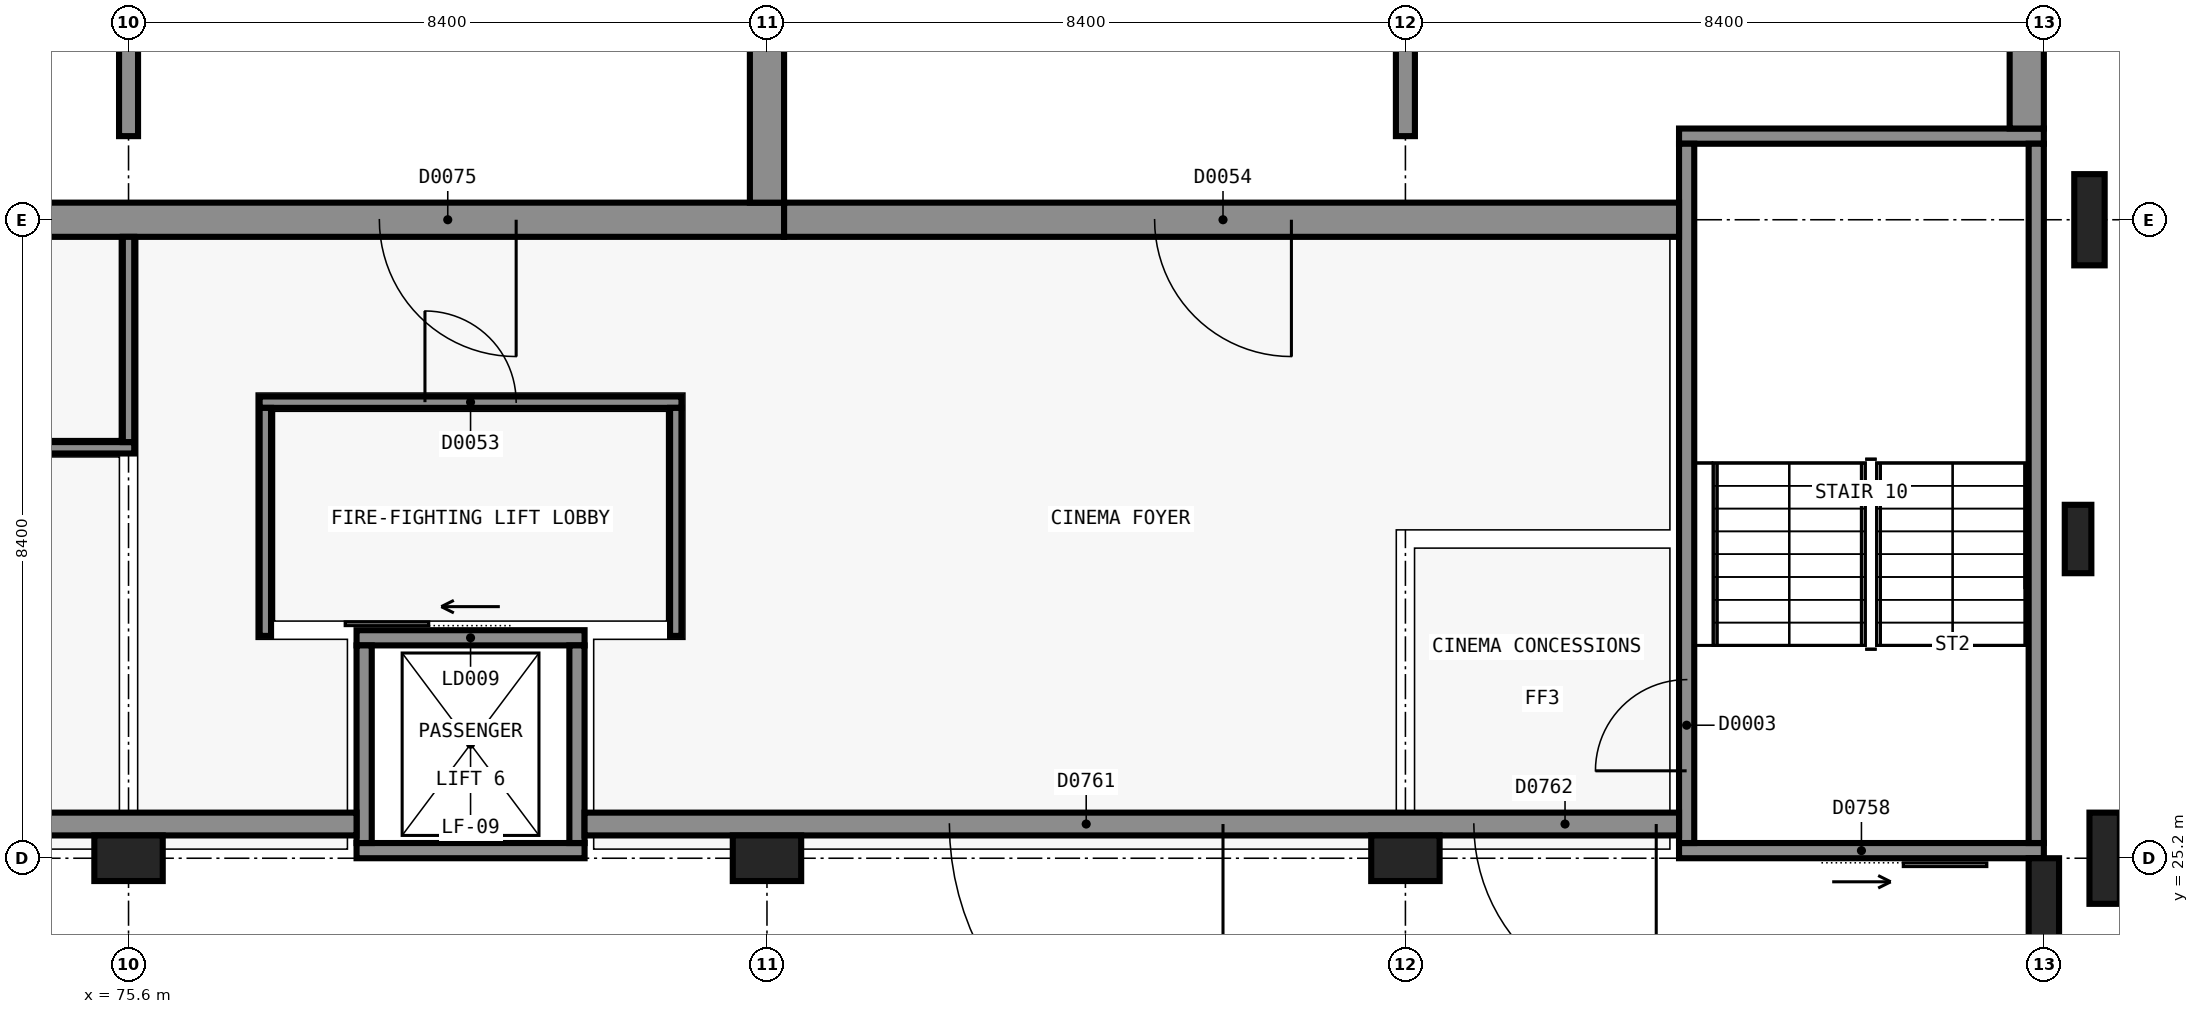
"""IFC4 building model, lengths in metres.
Left out: names, types, materials, properties, quantities, classifications, styles, units other than length and angle.
Written with IfcOpenShell. Run it as: python <this file> out.ifc"""

import sys

from ifc_helpers import new_model, si_unit, direction, frame, frame_2d, origin, origin_2d, place, context, subcontext, project, spatial, polyline, rectangle, outline, extrude, element, fill, save


model = new_model("IFC4")
c1 = context("Model", 3, precision=1e-05, world=origin(), true_north=direction((0.0, 1.0)))
c2 = subcontext(c1, "Body", "Model", "MODEL_VIEW")
j1 = project(units=[si_unit("LENGTHUNIT", "METRE"), si_unit("PLANEANGLEUNIT", "RADIAN")], contexts=[c1])
p1 = place(None, origin())
s1 = spatial("IfcSite", under=j1, at=p1, CompositionType="ELEMENT")
p2 = place(p1, origin())
s2 = spatial("IfcBuilding", under=s1, at=p2, CompositionType="ELEMENT")
p3 = place(p2, origin())
s3 = spatial("IfcBuildingStorey", under=s2, at=p3, CompositionType="ELEMENT", Elevation=0.0)
p4 = place(p3, frame((100.8, 25.3, -0.3), z_axis=(0.0, 0.0, 1.0), x_axis=(-1.0, 0.0, 0.0)))
e1 = element("IfcWall", 1, at=p4, inside=s3, PredefinedType="SHEAR", context=c2, shape_type="SweptSolid", body=[
    extrude(rectangle(XDim=4.8, YDim=0.2, at=frame_2d((2.4, 0.0))), origin(), (0.0, 0.0, 1.0), 5.7),
])
p5 = place(p4, frame((1.85, 0.0, 0.0)))
e2 = element("IfcOpeningElement", 2, at=p5, cuts=e1, PredefinedType="OPENING", context=c2, shape_type="SweptSolid", body=[
    extrude(rectangle(XDim=1.1, YDim=2.2, at=frame_2d((0.55, 1.1))), frame((0.0, 0.11, 0.0), z_axis=(0.0, -1.0, 0.0), x_axis=(1.0, 0.0, 0.0)), (0.0, 0.0, 1.0), 0.22),
])
p6 = place(p3, frame((96.0, 34.7, -0.3), z_axis=(0.0, 0.0, 1.0), x_axis=(1.0, 0.0, 0.0)))
e3 = element("IfcWall", 3, at=p6, inside=s3, PredefinedType="SHEAR", context=c2, shape_type="SweptSolid", body=[
    extrude(rectangle(XDim=4.8, YDim=0.2, at=frame_2d((2.4, 0.0))), origin(), (0.0, 0.0, 1.0), 5.7),
])
p7 = place(p3, frame((96.1, 25.4, -0.3), z_axis=(0.0, 0.0, 1.0), x_axis=(0.0, 1.0, 0.0)))
e4 = element("IfcWall", 4, at=p7, inside=s3, PredefinedType="SHEAR", context=c2, shape_type="SweptSolid", body=[
    extrude(rectangle(XDim=9.2, YDim=0.2, at=frame_2d((4.6, 0.0))), origin(), (0.0, 0.0, 1.0), 5.7),
])
p8 = place(p7, frame((0.95, 0.0, 0.3)))
e5 = element("IfcOpeningElement", 5, at=p8, cuts=e4, PredefinedType="OPENING", context=c2, shape_type="SweptSolid", body=[
    extrude(rectangle(XDim=1.2, YDim=2.1, at=frame_2d((0.6, 1.05))), frame((0.0, 0.11, 0.0), z_axis=(0.0, -1.0, 0.0), x_axis=(1.0, 0.0, 0.0)), (0.0, 0.0, 1.0), 0.22),
])
p9 = place(p3, frame((100.7, 34.6, -0.3), z_axis=(0.0, 0.0, 1.0), x_axis=(0.0, -1.0, 0.0)))
e6 = element("IfcWall", 6, at=p9, inside=s3, PredefinedType="SHEAR", context=c2, shape_type="SweptSolid", body=[
    extrude(rectangle(XDim=9.2, YDim=0.2, at=frame_2d((4.6, 0.0))), origin(), (0.0, 0.0, 1.0), 5.7),
])
p10 = place(p3, frame((81.6, 25.3, -1.6), z_axis=(0.0, 0.0, 1.0), x_axis=(-1.0, 0.0, 0.0)))
e7 = element("IfcWall", 7, at=p10, inside=s3, PredefinedType="SHEAR", context=c2, shape_type="SweptSolid", body=[
    extrude(rectangle(XDim=3.0, YDim=0.2, at=frame_2d((1.5, 0.0))), origin(), (0.0, 0.0, 1.0), 7.0),
])
p11 = place(p3, frame((78.6, 28.1, -1.6), z_axis=(0.0, 0.0, 1.0), x_axis=(1.0, 0.0, 0.0)))
e8 = element("IfcWall", 8, at=p11, inside=s3, PredefinedType="SHEAR", context=c2, shape_type="SweptSolid", body=[
    extrude(rectangle(XDim=3.0, YDim=0.2, at=frame_2d((1.5, 0.0))), origin(), (0.0, 0.0, 1.0), 7.0),
])
p12 = place(p11, frame((0.95, 0.0, 1.6)))
e9 = element("IfcOpeningElement", 9, at=p12, cuts=e8, PredefinedType="OPENING", context=c2, shape_type="SweptSolid", body=[
    extrude(rectangle(XDim=1.1, YDim=2.1, at=frame_2d((0.55, 1.05))), frame((0.0, 0.11, 0.0), z_axis=(0.0, -1.0, 0.0), x_axis=(1.0, 0.0, 0.0)), (0.0, 0.0, 1.0), 0.22),
])
for number, where, z_axis, x_axis in (
    (10, (78.7, 25.4, -1.6), (0.0, 0.0, 1.0), (0.0, 1.0, 0.0)),
    (11, (81.5, 28.0, -1.6), (0.0, 0.0, 1.0), (0.0, -1.0, 0.0)),
):
    element("IfcWall", number, at=place(p3, frame(where, z_axis=z_axis, x_axis=x_axis)), inside=s3, PredefinedType="SHEAR", context=c2, shape_type="SweptSolid", body=[
        extrude(rectangle(XDim=2.6, YDim=0.2, at=frame_2d((1.3, 0.0))), origin(), (0.0, 0.0, 1.0), 7.0),
    ])
p13 = place(p3, frame((84.225, 33.6, -0.3), z_axis=(0.0, 0.0, 1.0), x_axis=(-1.0, 0.0, 0.0)))
e12 = element("IfcWall", 12, at=p13, inside=s3, PredefinedType="SHEAR", context=c2, shape_type="SweptSolid", body=[
    extrude(rectangle(XDim=17.025, YDim=0.45, at=frame_2d((8.513, 0.0))), origin(), (0.0, 0.0, 1.0), 5.7),
])
p14 = place(p13, frame((3.525, 0.0, 0.3)))
e13 = element("IfcOpeningElement", 13, at=p14, cuts=e12, PredefinedType="OPENING", context=c2, shape_type="SweptSolid", body=[
    extrude(rectangle(XDim=1.8, YDim=2.1, at=frame_2d((0.9, 1.05))), frame((0.0, 0.235, 0.0), z_axis=(0.0, -1.0, 0.0), x_axis=(1.0, 0.0, 0.0)), (0.0, 0.0, 1.0), 0.47),
])
p15 = place(p3, frame((84.0, 58.575, -0.3), z_axis=(0.0, 0.0, 1.0), x_axis=(0.0, -1.0, 0.0)))
e14 = element("IfcWall", 14, at=p15, inside=s3, PredefinedType="SHEAR", context=c2, shape_type="SweptSolid", body=[
    extrude(rectangle(XDim=24.75, YDim=0.45, at=frame_2d((12.375, 0.0))), origin(), (0.0, 0.0, 1.0), 5.7),
])
p16 = place(p3, frame((96.0, 33.6, -0.3), z_axis=(0.0, 0.0, 1.0), x_axis=(-1.0, 0.0, 0.0)))
e15 = element("IfcWall", 15, at=p16, inside=s3, PredefinedType="SHEAR", context=c2, shape_type="SweptSolid", body=[
    extrude(rectangle(XDim=11.775, YDim=0.45, at=frame_2d((5.887, 0.0))), origin(), (0.0, 0.0, 1.0), 5.7),
])
p17 = place(p16, frame((5.1, 0.0, 0.3)))
e16 = element("IfcOpeningElement", 16, at=p17, cuts=e15, PredefinedType="OPENING", context=c2, shape_type="SweptSolid", body=[
    extrude(rectangle(XDim=1.8, YDim=2.1, at=frame_2d((0.9, 1.05))), frame((0.0, 0.235, 0.0), z_axis=(0.0, -1.0, 0.0), x_axis=(1.0, 0.0, 0.0)), (0.0, 0.0, 1.0), 0.47),
])
p18 = place(p3, frame((100.575, 57.6, -0.3), z_axis=(0.0, 0.0, 1.0), x_axis=(0.0, -1.0, 0.0)))
e17 = element("IfcWall", 17, at=p18, inside=s3, PredefinedType="SHEAR", context=c2, shape_type="SweptSolid", body=[
    extrude(rectangle(XDim=22.8, YDim=0.45, at=frame_2d((11.4, 0.0))), origin(), (0.0, 0.0, 1.0), 5.7),
])
for number, where, z_axis, x_axis in (
    (18, (75.6, 34.7, -0.3), (0.0, 0.0, 1.0), (0.0, 1.0, 0.0)),
    (19, (92.4, 34.7, -0.3), (0.0, 0.0, 1.0), (0.0, 1.0, 0.0)),
):
    element("IfcWall", number, at=place(p3, frame(where, z_axis=z_axis, x_axis=x_axis)), inside=s3, PredefinedType="SOLIDWALL", context=c2, shape_type="SweptSolid", body=[
        extrude(outline(polyline([(0.0, 0.0), (23.875, 0.0), (23.875, 3.497), (0.0, 0.154), (0.0, 0.0)])), frame((0.0, 0.125, 0.0), z_axis=(0.0, -1.0, 0.0), x_axis=(1.0, 0.0, 0.0)), (0.0, 0.0, 1.0), 0.25),
    ])
for number, where, z_axis, x_axis in (
    (20, (75.6, 25.2, -0.3), (0.0, 0.0, 1.0), (1.0, 0.0, 0.0)),
    (21, (84.0, 25.2, -0.3), (0.0, 0.0, 1.0), (1.0, 0.0, 0.0)),
    (22, (92.4, 25.2, -0.3), (0.0, 0.0, 1.0), (1.0, 0.0, 0.0)),
):
    element("IfcColumn", number, at=place(p3, frame(where, z_axis=z_axis, x_axis=x_axis)), inside=s3, PredefinedType="COLUMN", context=c2, shape_type="SweptSolid", body=[
        extrude(rectangle(XDim=0.9, YDim=0.6, at=origin_2d()), origin(), (0.0, 0.0, 1.0), 5.7),
    ])
p19 = place(p3, frame((78.6, 25.65, 0.0), z_axis=(0.0, 0.0, 1.0), x_axis=(-1.0, 0.0, 0.0)))
e23 = element("IfcWall", 23, at=p19, inside=s3, PredefinedType="SOLIDWALL", context=c2, shape_type="SweptSolid", body=[
    extrude(rectangle(XDim=11.4, YDim=0.3, at=frame_2d((5.7, 0.0))), origin(), (0.0, 0.0, 1.0), 5.1),
])
p20 = place(p19, frame((5.4, 0.0, 0.0)))
e24 = element("IfcOpeningElement", 24, at=p20, cuts=e23, PredefinedType="OPENING", context=c2, shape_type="SweptSolid", body=[
    extrude(rectangle(XDim=3.6, YDim=2.8, at=frame_2d((1.8, 1.4))), frame((0.0, 0.16, 0.0), z_axis=(0.0, -1.0, 0.0), x_axis=(1.0, 0.0, 0.0)), (0.0, 0.0, 1.0), 0.32),
])
p21 = place(p3, frame((96.0, 25.65, 0.0), z_axis=(0.0, 0.0, 1.0), x_axis=(-1.0, 0.0, 0.0)))
e25 = element("IfcWall", 25, at=p21, inside=s3, PredefinedType="SOLIDWALL", context=c2, shape_type="SweptSolid", body=[
    extrude(rectangle(XDim=14.4, YDim=0.3, at=frame_2d((7.2, 0.0))), origin(), (0.0, 0.0, 1.0), 5.1),
])
p22 = place(p21, frame((6.0, 0.0, 0.0)))
e26 = element("IfcOpeningElement", 26, at=p22, cuts=e25, PredefinedType="OPENING", context=c2, shape_type="SweptSolid", body=[
    extrude(rectangle(XDim=3.6, YDim=2.8, at=frame_2d((1.8, 1.4))), frame((0.0, 0.16, 0.0), z_axis=(0.0, -1.0, 0.0), x_axis=(1.0, 0.0, 0.0)), (0.0, 0.0, 1.0), 0.32),
])
p23 = place(p21, frame((0.3, 0.0, 0.0)))
e27 = element("IfcOpeningElement", 27, at=p23, cuts=e25, PredefinedType="OPENING", context=c2, shape_type="SweptSolid", body=[
    extrude(rectangle(XDim=2.4, YDim=2.4, at=frame_2d((1.2, 1.2))), frame((0.0, 0.16, 0.0), z_axis=(0.0, -1.0, 0.0), x_axis=(1.0, 0.0, 0.0)), (0.0, 0.0, 1.0), 0.32),
])
for number, where, z_axis, x_axis in (
    (28, (100.8, 24.6, -0.3), (0.0, 0.0, 1.0), (1.0, 0.0, 0.0)),
    (29, (101.6, 25.2, -0.3), (0.0, 0.0, 1.0), (0.0, 1.0, 0.0)),
):
    element("IfcColumn", number, at=place(p3, frame(where, z_axis=z_axis, x_axis=x_axis)), inside=s3, PredefinedType="PILASTER", context=c2, shape_type="SweptSolid", body=[
        extrude(rectangle(XDim=0.4, YDim=1.2, at=origin_2d()), origin(), (0.0, 0.0, 1.0), 5.7),
    ])
p24 = place(p3, frame((101.25, 29.4, -0.3), z_axis=(0.0, 0.0, 1.0), x_axis=(0.0, 1.0, 0.0)))
e30 = element("IfcColumn", 30, at=p24, inside=s3, PredefinedType="PILASTER", context=c2, shape_type="SweptSolid", body=[
    extrude(rectangle(XDim=0.35, YDim=0.9, at=origin_2d()), origin(), (0.0, 0.0, 1.0), 5.7),
])
p25 = place(p3, frame((101.4, 33.6, -0.3), z_axis=(0.0, 0.0, 1.0), x_axis=(0.0, 1.0, 0.0)))
e31 = element("IfcColumn", 31, at=p25, inside=s3, PredefinedType="PILASTER", context=c2, shape_type="SweptSolid", body=[
    extrude(rectangle(XDim=0.4, YDim=1.2, at=origin_2d()), origin(), (0.0, 0.0, 1.0), 5.7),
])
p26 = place(p3, frame((67.2, 30.6, 0.0), z_axis=(0.0, 0.0, 1.0), x_axis=(1.0, 0.0, 0.0)))
e32 = element("IfcWall", 32, at=p26, inside=s3, PredefinedType="PARTITIONING", context=c2, shape_type="SweptSolid", body=[
    extrude(rectangle(XDim=8.475, YDim=0.15, at=frame_2d((4.237, 0.0))), origin(), (0.0, 0.0, 1.0), 4.4),
])
p27 = place(p26, frame((3.7, 0.0, 0.0)))
e33 = element("IfcOpeningElement", 33, at=p27, cuts=e32, PredefinedType="OPENING", context=c2, shape_type="SweptSolid", body=[
    extrude(rectangle(XDim=1.0, YDim=2.1, at=frame_2d((0.5, 1.05))), frame((0.0, 0.085, 0.0), z_axis=(0.0, -1.0, 0.0), x_axis=(1.0, 0.0, 0.0)), (0.0, 0.0, 1.0), 0.17),
])
p28 = place(p3, frame((77.325, 31.2, 0.0), z_axis=(0.0, 0.0, 1.0), x_axis=(1.0, 0.0, 0.0)))
e34 = element("IfcWall", 34, at=p28, inside=s3, PredefinedType="SOLIDWALL", context=c2, shape_type="SweptSolid", body=[
    extrude(rectangle(XDim=5.55, YDim=0.15, at=frame_2d((2.775, 0.0))), origin(), (0.0, 0.0, 1.0), 5.1),
])
p29 = place(p28, frame((2.175, 0.0, 0.0)))
e35 = element("IfcOpeningElement", 35, at=p29, cuts=e34, PredefinedType="OPENING", context=c2, shape_type="SweptSolid", body=[
    extrude(rectangle(XDim=1.2, YDim=2.1, at=frame_2d((0.6, 1.05))), frame((0.0, 0.085, 0.0), z_axis=(0.0, -1.0, 0.0), x_axis=(1.0, 0.0, 0.0)), (0.0, 0.0, 1.0), 0.17),
])
p30 = place(p3, frame((75.6, 30.675, 0.0), z_axis=(0.0, 0.0, 1.0), x_axis=(0.0, 1.0, 0.0)))
e36 = element("IfcWall", 36, at=p30, inside=s3, PredefinedType="PARTITIONING", context=c2, shape_type="SweptSolid", body=[
    extrude(rectangle(XDim=2.7, YDim=0.15, at=frame_2d((1.35, 0.0))), origin(), (0.0, 0.0, 1.0), 4.4),
])
for number, where, z_axis, x_axis in (
    (37, (77.4, 28.125, 0.0), (0.0, 0.0, 1.0), (0.0, 1.0, 0.0)),
    (38, (82.8, 28.125, 0.0), (0.0, 0.0, 1.0), (0.0, 1.0, 0.0)),
):
    element("IfcWall", number, at=place(p3, frame(where, z_axis=z_axis, x_axis=x_axis)), inside=s3, PredefinedType="SOLIDWALL", context=c2, shape_type="SweptSolid", body=[
        extrude(rectangle(XDim=3.0, YDim=0.15, at=frame_2d((1.5, 0.0))), origin(), (0.0, 0.0, 1.0), 5.1),
    ])
p31 = place(p5, origin())
e39 = element("IfcDoor", 39, at=p31, inside=s3, OperationType="SLIDING_TO_LEFT", PredefinedType="DOOR", context=c2, shape_type="SweptSolid", body=[
    extrude(rectangle(XDim=1.1, YDim=2.2, at=frame_2d((0.55, 1.1))), frame((0.0, 0.025, 0.0), z_axis=(0.0, -1.0, 0.0), x_axis=(1.0, 0.0, 0.0)), (0.0, 0.0, 1.0), 0.05),
])
fill(e2, e39)
p32 = place(p22, origin())
e40 = element("IfcDoor", 40, at=p32, inside=s3, OperationType="DOUBLE_DOOR_DOUBLE_SWING", PredefinedType="DOOR", context=c2, shape_type="SweptSolid", body=[
    extrude(rectangle(XDim=3.6, YDim=2.8, at=frame_2d((1.8, 1.4))), frame((0.0, 0.025, 0.0), z_axis=(0.0, -1.0, 0.0), x_axis=(1.0, 0.0, 0.0)), (0.0, 0.0, 1.0), 0.05),
])
fill(e26, e40)
p33 = place(p23, origin())
e41 = element("IfcDoor", 41, at=p33, inside=s3, OperationType="DOUBLE_DOOR_DOUBLE_SWING", PredefinedType="DOOR", context=c2, shape_type="SweptSolid", body=[
    extrude(rectangle(XDim=2.4, YDim=2.4, at=frame_2d((1.2, 1.2))), frame((0.0, 0.025, 0.0), z_axis=(0.0, -1.0, 0.0), x_axis=(1.0, 0.0, 0.0)), (0.0, 0.0, 1.0), 0.05),
])
fill(e27, e41)
p34 = place(p12, origin())
e42 = element("IfcDoor", 42, at=p34, inside=s3, OperationType="SLIDING_TO_LEFT", PredefinedType="DOOR", context=c2, shape_type="SweptSolid", body=[
    extrude(rectangle(XDim=1.1, YDim=2.1, at=frame_2d((0.55, 1.05))), frame((0.0, 0.025, 0.0), z_axis=(0.0, -1.0, 0.0), x_axis=(1.0, 0.0, 0.0)), (0.0, 0.0, 1.0), 0.05),
])
fill(e9, e42)
p35 = place(p8, origin())
e43 = element("IfcDoor", 43, at=p35, inside=s3, OperationType="SINGLE_SWING_LEFT", PredefinedType="DOOR", context=c2, shape_type="SweptSolid", body=[
    extrude(rectangle(XDim=1.2, YDim=2.1, at=frame_2d((0.6, 1.05))), frame((0.0, 0.025, 0.0), z_axis=(0.0, -1.0, 0.0), x_axis=(1.0, 0.0, 0.0)), (0.0, 0.0, 1.0), 0.05),
])
fill(e5, e43)
p36 = place(p29, origin())
e44 = element("IfcDoor", 44, at=p36, inside=s3, OperationType="SINGLE_SWING_LEFT", PredefinedType="DOOR", context=c2, shape_type="SweptSolid", body=[
    extrude(rectangle(XDim=1.2, YDim=2.1, at=frame_2d((0.6, 1.05))), frame((0.0, 0.025, 0.0), z_axis=(0.0, -1.0, 0.0), x_axis=(1.0, 0.0, 0.0)), (0.0, 0.0, 1.0), 0.05),
])
fill(e35, e44)
p37 = place(p17, origin())
e45 = element("IfcDoor", 45, at=p37, inside=s3, OperationType="DOUBLE_DOOR_SINGLE_SWING", PredefinedType="DOOR", context=c2, shape_type="SweptSolid", body=[
    extrude(rectangle(XDim=1.8, YDim=2.1, at=frame_2d((0.9, 1.05))), frame((0.0, 0.025, 0.0), z_axis=(0.0, -1.0, 0.0), x_axis=(1.0, 0.0, 0.0)), (0.0, 0.0, 1.0), 0.05),
])
fill(e16, e45)
p38 = place(p14, origin())
e46 = element("IfcDoor", 46, at=p38, inside=s3, OperationType="DOUBLE_DOOR_SINGLE_SWING", PredefinedType="DOOR", context=c2, shape_type="SweptSolid", body=[
    extrude(rectangle(XDim=1.8, YDim=2.1, at=frame_2d((0.9, 1.05))), frame((0.0, 0.025, 0.0), z_axis=(0.0, -1.0, 0.0), x_axis=(1.0, 0.0, 0.0)), (0.0, 0.0, 1.0), 0.05),
])
fill(e13, e46)
save(model, sys.argv[1])
